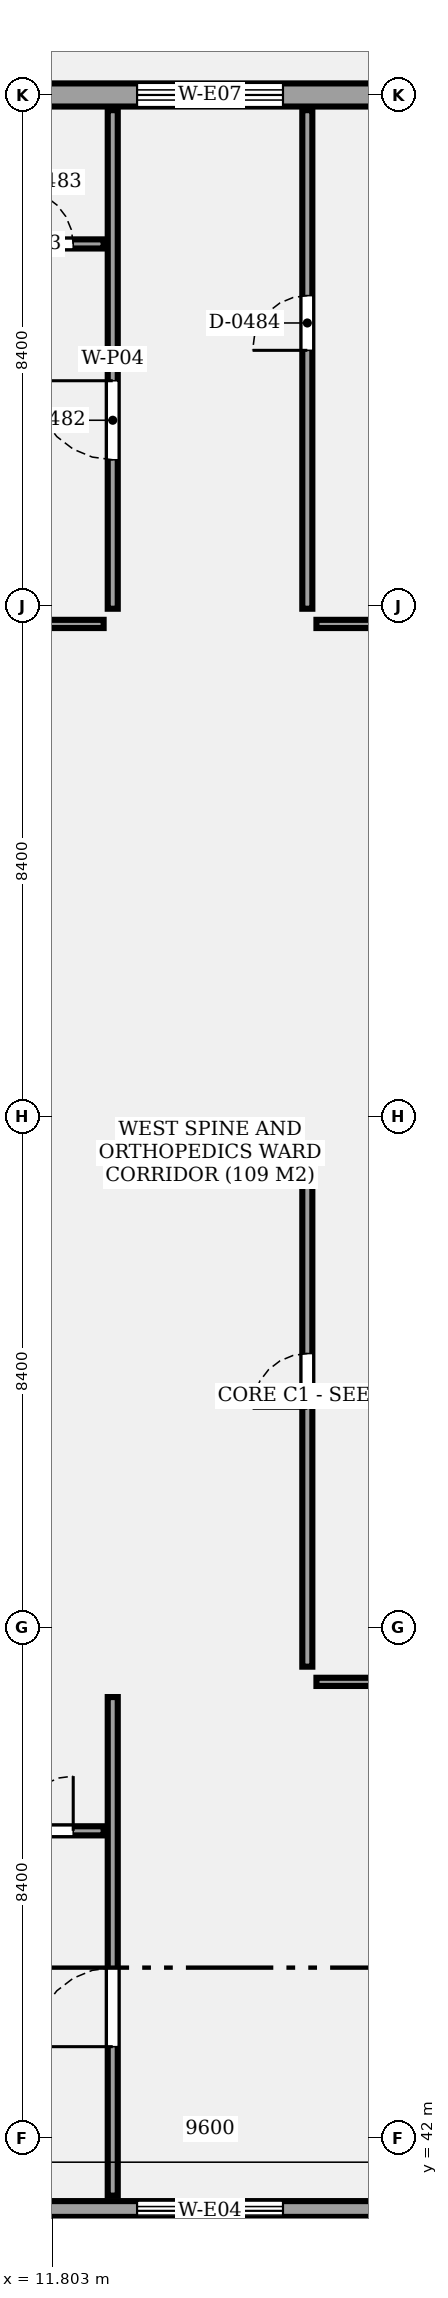
"""IFC4 building model, lengths in metres.
Left out: names, types, materials, properties, quantities, classifications, styles, units other than length and angle.
Written with IfcOpenShell. Run it as: python <this file> out.ifc"""

import sys

from ifc_helpers import new_model, si_unit, direction, frame, frame_2d, origin, place, context, subcontext, project, spatial, rectangle, extrude, element, fill, save


model = new_model("IFC4")
c1 = context("Model", 3, precision=1e-05, world=origin(), true_north=direction((0.0, 1.0)))
c2 = subcontext(c1, "Body", "Model", "MODEL_VIEW")
j1 = project(units=[si_unit("LENGTHUNIT", "METRE"), si_unit("PLANEANGLEUNIT", "RADIAN")], contexts=[c1])
p1 = place(None, origin())
s1 = spatial("IfcSite", under=j1, at=p1, CompositionType="ELEMENT")
p2 = place(p1, origin())
s2 = spatial("IfcBuilding", under=s1, at=p2, CompositionType="ELEMENT")
p3 = place(p2, frame((0.0, 0.0, 26.2)))
s3 = spatial("IfcBuildingStorey", under=s2, at=p3, CompositionType="ELEMENT", Elevation=26.2)
p4 = place(p3, frame((19.2, 40.8, 0.0), z_axis=(0.0, 0.0, 1.0), x_axis=(-1.0, 0.0, 0.0)))
e1 = element("IfcWall", 1, at=p4, inside=s3, PredefinedType="SOLIDWALL", context=c2, shape_type="SweptSolid", body=[
    extrude(rectangle(XDim=9.6, YDim=0.32, at=frame_2d((4.8, 0.0))), origin(), (0.0, 0.0, 1.0), 3.39),
])
p5 = place(p4, frame((3.6, 0.0, 0.85)))
e2 = element("IfcOpeningElement", 2, at=p5, cuts=e1, PredefinedType="OPENING", context=c2, shape_type="SweptSolid", body=[
    extrude(rectangle(XDim=2.4, YDim=1.4, at=frame_2d((1.2, 0.7))), frame((0.0, 0.17, 0.0), z_axis=(0.0, -1.0, 0.0), x_axis=(1.0, 0.0, 0.0)), (0.0, 0.0, 1.0), 0.34),
])
p6 = place(p3, frame((9.6, 75.6, 0.0), z_axis=(0.0, 0.0, 1.0), x_axis=(1.0, 0.0, 0.0)))
e3 = element("IfcWall", 3, at=p6, inside=s3, PredefinedType="SOLIDWALL", context=c2, shape_type="SweptSolid", body=[
    extrude(rectangle(XDim=9.6, YDim=0.38, at=frame_2d((4.8, 0.0))), origin(), (0.0, 0.0, 1.0), 3.39),
])
p7 = place(p6, frame((3.6, 0.0, 0.85)))
e4 = element("IfcOpeningElement", 4, at=p7, cuts=e3, PredefinedType="OPENING", context=c2, shape_type="SweptSolid", body=[
    extrude(rectangle(XDim=2.4, YDim=1.4, at=frame_2d((1.2, 0.7))), frame((0.0, 0.2, 0.0), z_axis=(0.0, -1.0, 0.0), x_axis=(1.0, 0.0, 0.0)), (0.0, 0.0, 1.0), 0.4),
])
p8 = place(p3, frame((12.8, 41.05, 0.0), z_axis=(0.0, 0.0, 1.0), x_axis=(0.0, 1.0, 0.0)))
e5 = element("IfcWall", 5, at=p8, inside=s3, PredefinedType="PARTITIONING", context=c2, shape_type="SweptSolid", body=[
    extrude(rectangle(XDim=8.2, YDim=0.165, at=frame_2d((4.1, 0.0))), origin(), (0.0, 0.0, 1.0), 3.3),
])
p9 = place(p8, frame((2.45, 0.0, 0.0)))
e6 = element("IfcOpeningElement", 6, at=p9, cuts=e5, PredefinedType="OPENING", context=c2, shape_type="SweptSolid", body=[
    extrude(rectangle(XDim=1.3, YDim=2.2, at=frame_2d((0.65, 1.1))), frame((0.0, 0.093, 0.0), z_axis=(0.0, -1.0, 0.0), x_axis=(1.0, 0.0, 0.0)), (0.0, 0.0, 1.0), 0.185),
])
p10 = place(p3, frame((10.25, 47.05, 0.0), z_axis=(0.0, 0.0, 1.0), x_axis=(1.0, 0.0, 0.0)))
e7 = element("IfcWall", 7, at=p10, inside=s3, PredefinedType="PARTITIONING", context=c2, shape_type="SweptSolid", body=[
    extrude(rectangle(XDim=2.4, YDim=0.15, at=frame_2d((1.2, 0.0))), origin(), (0.0, 0.0, 1.0), 3.3),
])
p11 = place(p10, frame((1.0, 0.0, 0.0)))
e8 = element("IfcOpeningElement", 8, at=p11, cuts=e7, PredefinedType="OPENING", context=c2, shape_type="SweptSolid", body=[
    extrude(rectangle(XDim=0.9, YDim=2.1, at=frame_2d((0.45, 1.05))), frame((0.0, 0.085, 0.0), z_axis=(0.0, -1.0, 0.0), x_axis=(1.0, 0.0, 0.0)), (0.0, 0.0, 1.0), 0.17),
])
p12 = place(p3, frame((16.0, 49.75, 0.0), z_axis=(0.0, 0.0, 1.0), x_axis=(0.0, 1.0, 0.0)))
e9 = element("IfcWall", 9, at=p12, inside=s3, PredefinedType="PARTITIONING", context=c2, shape_type="SweptSolid", body=[
    extrude(rectangle(XDim=8.2, YDim=0.165, at=frame_2d((4.1, 0.0))), origin(), (0.0, 0.0, 1.0), 3.3),
])
p13 = place(p12, frame((4.25, 0.0, 0.0)))
e10 = element("IfcOpeningElement", 10, at=p13, cuts=e9, PredefinedType="OPENING", context=c2, shape_type="SweptSolid", body=[
    extrude(rectangle(XDim=0.9, YDim=2.1, at=frame_2d((0.45, 1.05))), frame((0.0, 0.093, 0.0), z_axis=(0.0, -1.0, 0.0), x_axis=(1.0, 0.0, 0.0)), (0.0, 0.0, 1.0), 0.185),
])
p14 = place(p3, frame((16.15, 49.5, 0.0), z_axis=(0.0, 0.0, 1.0), x_axis=(1.0, 0.0, 0.0)))
e11 = element("IfcWall", 11, at=p14, inside=s3, PredefinedType="PARTITIONING", context=c2, shape_type="SweptSolid", body=[
    extrude(rectangle(XDim=12.1, YDim=0.135, at=frame_2d((6.05, 0.0))), origin(), (0.0, 0.0, 1.0), 3.3),
])
p15 = place(p3, frame((12.8, 67.15, 0.0), z_axis=(0.0, 0.0, 1.0), x_axis=(0.0, 1.0, 0.0)))
e12 = element("IfcWall", 12, at=p15, inside=s3, PredefinedType="PARTITIONING", context=c2, shape_type="SweptSolid", body=[
    extrude(rectangle(XDim=8.2, YDim=0.165, at=frame_2d((4.1, 0.0))), origin(), (0.0, 0.0, 1.0), 3.3),
])
p16 = place(p15, frame((2.45, 0.0, 0.0)))
e13 = element("IfcOpeningElement", 13, at=p16, cuts=e12, PredefinedType="OPENING", context=c2, shape_type="SweptSolid", body=[
    extrude(rectangle(XDim=1.3, YDim=2.2, at=frame_2d((0.65, 1.1))), frame((0.0, 0.093, 0.0), z_axis=(0.0, -1.0, 0.0), x_axis=(1.0, 0.0, 0.0)), (0.0, 0.0, 1.0), 0.185),
])
p17 = place(p3, frame((10.25, 73.15, 0.0), z_axis=(0.0, 0.0, 1.0), x_axis=(1.0, 0.0, 0.0)))
e14 = element("IfcWall", 14, at=p17, inside=s3, PredefinedType="PARTITIONING", context=c2, shape_type="SweptSolid", body=[
    extrude(rectangle(XDim=2.4, YDim=0.15, at=frame_2d((1.2, 0.0))), origin(), (0.0, 0.0, 1.0), 3.3),
])
p18 = place(p17, frame((1.0, 0.0, 0.0)))
e15 = element("IfcOpeningElement", 15, at=p18, cuts=e14, PredefinedType="OPENING", context=c2, shape_type="SweptSolid", body=[
    extrude(rectangle(XDim=0.9, YDim=2.1, at=frame_2d((0.45, 1.05))), frame((0.0, 0.085, 0.0), z_axis=(0.0, -1.0, 0.0), x_axis=(1.0, 0.0, 0.0)), (0.0, 0.0, 1.0), 0.17),
])
p19 = place(p3, frame((0.55, 66.9, 0.0), z_axis=(0.0, 0.0, 1.0), x_axis=(1.0, 0.0, 0.0)))
e16 = element("IfcWall", 16, at=p19, inside=s3, PredefinedType="PARTITIONING", context=c2, shape_type="SweptSolid", body=[
    extrude(rectangle(XDim=12.1, YDim=0.135, at=frame_2d((6.05, 0.0))), origin(), (0.0, 0.0, 1.0), 3.3),
])
p20 = place(p3, frame((16.0, 67.15, 0.0), z_axis=(0.0, 0.0, 1.0), x_axis=(0.0, 1.0, 0.0)))
e17 = element("IfcWall", 17, at=p20, inside=s3, PredefinedType="PARTITIONING", context=c2, shape_type="SweptSolid", body=[
    extrude(rectangle(XDim=8.2, YDim=0.165, at=frame_2d((4.1, 0.0))), origin(), (0.0, 0.0, 1.0), 3.3),
])
p21 = place(p20, frame((4.25, 0.0, 0.0)))
e18 = element("IfcOpeningElement", 18, at=p21, cuts=e17, PredefinedType="OPENING", context=c2, shape_type="SweptSolid", body=[
    extrude(rectangle(XDim=0.9, YDim=2.1, at=frame_2d((0.45, 1.05))), frame((0.0, 0.093, 0.0), z_axis=(0.0, -1.0, 0.0), x_axis=(1.0, 0.0, 0.0)), (0.0, 0.0, 1.0), 0.185),
])
p22 = place(p3, frame((16.15, 66.9, 0.0), z_axis=(0.0, 0.0, 1.0), x_axis=(1.0, 0.0, 0.0)))
e19 = element("IfcWall", 19, at=p22, inside=s3, PredefinedType="PARTITIONING", context=c2, shape_type="SweptSolid", body=[
    extrude(rectangle(XDim=12.1, YDim=0.135, at=frame_2d((6.05, 0.0))), origin(), (0.0, 0.0, 1.0), 3.3),
])
p23 = place(p5, origin())
e20 = element("IfcWindow", 20, at=p23, inside=s3, PartitioningType="SINGLE_PANEL", PredefinedType="WINDOW", context=c2, shape_type="SweptSolid", body=[
    extrude(rectangle(XDim=2.4, YDim=1.4, at=frame_2d((1.2, 0.7))), frame((0.0, 0.03, 0.0), z_axis=(0.0, -1.0, 0.0), x_axis=(1.0, 0.0, 0.0)), (0.0, 0.0, 1.0), 0.06),
])
fill(e2, e20)
p24 = place(p7, origin())
e21 = element("IfcWindow", 21, at=p24, inside=s3, PartitioningType="SINGLE_PANEL", PredefinedType="WINDOW", context=c2, shape_type="SweptSolid", body=[
    extrude(rectangle(XDim=2.4, YDim=1.4, at=frame_2d((1.2, 0.7))), frame((0.0, 0.03, 0.0), z_axis=(0.0, -1.0, 0.0), x_axis=(1.0, 0.0, 0.0)), (0.0, 0.0, 1.0), 0.06),
])
fill(e4, e21)
p25 = place(p9, origin())
e22 = element("IfcDoor", 22, at=p25, inside=s3, OperationType="SINGLE_SWING_LEFT", PredefinedType="DOOR", context=c2, shape_type="SweptSolid", body=[
    extrude(rectangle(XDim=1.3, YDim=2.2, at=frame_2d((0.65, 1.1))), frame((0.0, 0.025, 0.0), z_axis=(0.0, -1.0, 0.0), x_axis=(1.0, 0.0, 0.0)), (0.0, 0.0, 1.0), 0.05),
])
fill(e6, e22)
p26 = place(p11, origin())
e23 = element("IfcDoor", 23, at=p26, inside=s3, OperationType="SINGLE_SWING_RIGHT", PredefinedType="DOOR", context=c2, shape_type="SweptSolid", body=[
    extrude(rectangle(XDim=0.9, YDim=2.1, at=frame_2d((0.45, 1.05))), frame((0.0, 0.025, 0.0), z_axis=(0.0, -1.0, 0.0), x_axis=(1.0, 0.0, 0.0)), (0.0, 0.0, 1.0), 0.05),
])
fill(e8, e23)
p27 = place(p13, origin())
e24 = element("IfcDoor", 24, at=p27, inside=s3, OperationType="SINGLE_SWING_LEFT", PredefinedType="DOOR", context=c2, shape_type="SweptSolid", body=[
    extrude(rectangle(XDim=0.9, YDim=2.1, at=frame_2d((0.45, 1.05))), frame((0.0, 0.025, 0.0), z_axis=(0.0, -1.0, 0.0), x_axis=(1.0, 0.0, 0.0)), (0.0, 0.0, 1.0), 0.05),
])
fill(e10, e24)
p28 = place(p16, origin())
e25 = element("IfcDoor", 25, at=p28, inside=s3, OperationType="SINGLE_SWING_RIGHT", PredefinedType="DOOR", context=c2, shape_type="SweptSolid", body=[
    extrude(rectangle(XDim=1.3, YDim=2.2, at=frame_2d((0.65, 1.1))), frame((0.0, 0.025, 0.0), z_axis=(0.0, -1.0, 0.0), x_axis=(1.0, 0.0, 0.0)), (0.0, 0.0, 1.0), 0.05),
])
fill(e13, e25)
p29 = place(p18, origin())
e26 = element("IfcDoor", 26, at=p29, inside=s3, OperationType="SINGLE_SWING_LEFT", PredefinedType="DOOR", context=c2, shape_type="SweptSolid", body=[
    extrude(rectangle(XDim=0.9, YDim=2.1, at=frame_2d((0.45, 1.05))), frame((0.0, 0.025, 0.0), z_axis=(0.0, -1.0, 0.0), x_axis=(1.0, 0.0, 0.0)), (0.0, 0.0, 1.0), 0.05),
])
fill(e15, e26)
p30 = place(p21, origin())
e27 = element("IfcDoor", 27, at=p30, inside=s3, OperationType="SINGLE_SWING_LEFT", PredefinedType="DOOR", context=c2, shape_type="SweptSolid", body=[
    extrude(rectangle(XDim=0.9, YDim=2.1, at=frame_2d((0.45, 1.05))), frame((0.0, 0.025, 0.0), z_axis=(0.0, -1.0, 0.0), x_axis=(1.0, 0.0, 0.0)), (0.0, 0.0, 1.0), 0.05),
])
fill(e18, e27)
save(model, sys.argv[1])
